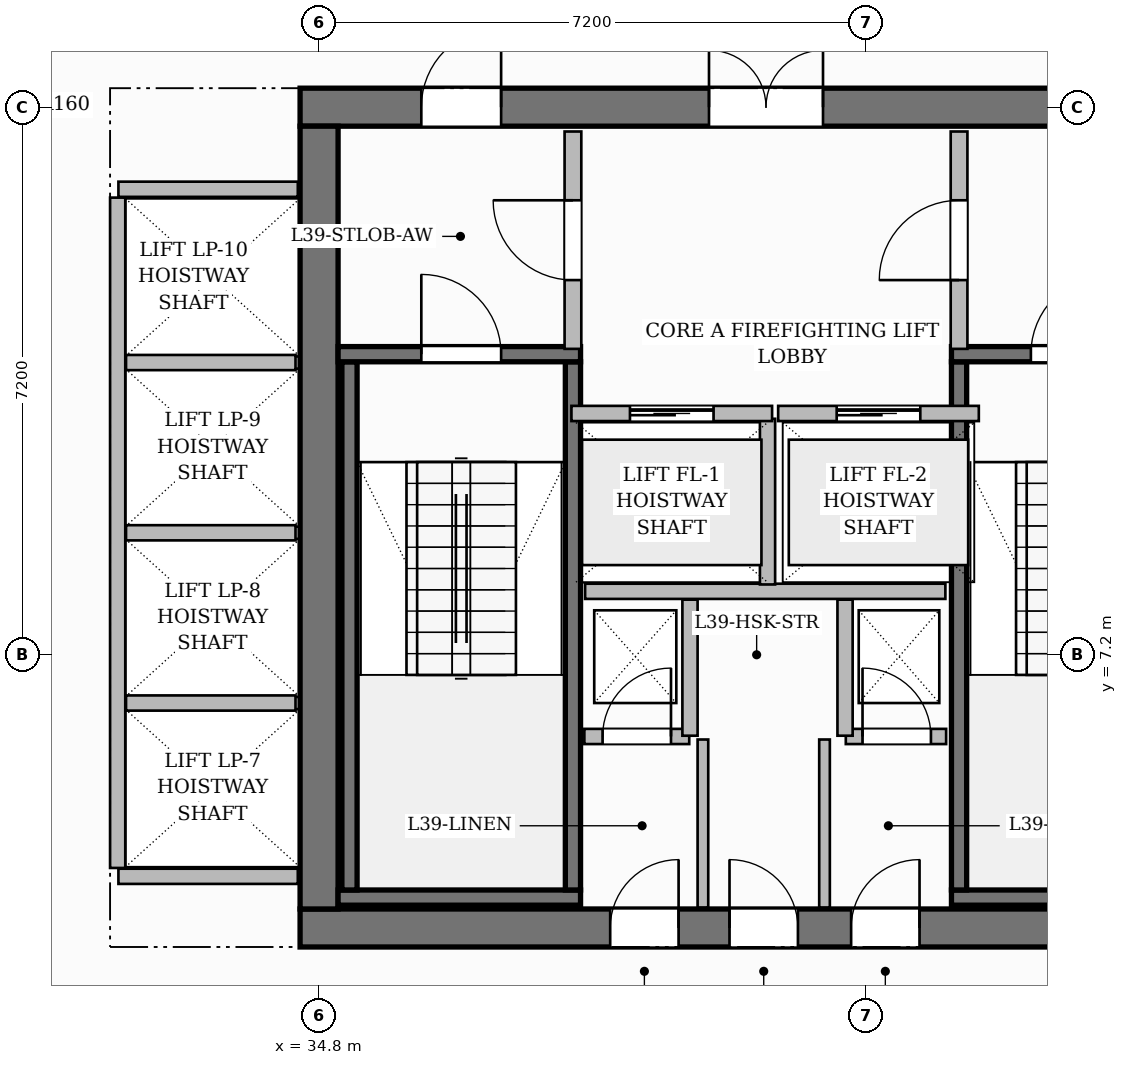
"""IFC4 building model, lengths in metres.
Left out: names, types, materials, properties, quantities, classifications, styles, units other than length and angle.
Written with IfcOpenShell. Run it as: python <this file> out.ifc"""

import sys

from ifc_helpers import new_model, si_unit, direction, frame, frame_2d, origin, place, context, subcontext, project, spatial, rectangle, extrude, source, transform, mapped, element, fill, save


model = new_model("IFC4")
c1 = context("Model", 3, precision=1e-05, world=origin(), true_north=direction((0.0, 1.0)))
c2 = subcontext(c1, "Body", "Model", "MODEL_VIEW")
j1 = project(units=[si_unit("LENGTHUNIT", "METRE"), si_unit("PLANEANGLEUNIT", "RADIAN")], contexts=[c1])
p1 = place(None, origin())
s1 = spatial("IfcSite", under=j1, at=p1, CompositionType="ELEMENT")
p2 = place(p1, origin())
s2 = spatial("IfcBuilding", under=s1, at=p2, CompositionType="ELEMENT")
p3 = place(p2, frame((0.0, 0.0, 158.0)))
s3 = spatial("IfcBuildingStorey", under=s2, at=p3, CompositionType="ELEMENT", Elevation=158.0)
p4 = place(p3, frame((34.55, 3.6, 0.0), z_axis=(0.0, 0.0, 1.0), x_axis=(1.0, 0.0, 0.0)))
e1 = element("IfcWall", 1, at=p4, inside=s3, PredefinedType="SHEAR", context=c2, shape_type="SweptSolid", body=[
    extrude(rectangle(XDim=15.5, YDim=0.5, at=frame_2d((7.75, 0.0))), origin(), (0.0, 0.0, 1.0), 3.85),
])
p5 = place(p4, frame((4.08, 0.0, 0.0)))
e2 = element("IfcOpeningElement", 2, at=p5, cuts=e1, PredefinedType="OPENING", context=c2, shape_type="SweptSolid", body=[
    extrude(rectangle(XDim=0.9, YDim=2.1, at=frame_2d((0.45, 1.05))), frame((0.0, 0.26, 0.0), z_axis=(0.0, -1.0, 0.0), x_axis=(1.0, 0.0, 0.0)), (0.0, 0.0, 1.0), 0.52),
])
p6 = place(p4, frame((5.65, 0.0, 0.0)))
e3 = element("IfcOpeningElement", 3, at=p6, cuts=e1, PredefinedType="OPENING", context=c2, shape_type="SweptSolid", body=[
    extrude(rectangle(XDim=0.9, YDim=2.1, at=frame_2d((0.45, 1.05))), frame((0.0, 0.26, 0.0), z_axis=(0.0, -1.0, 0.0), x_axis=(1.0, 0.0, 0.0)), (0.0, 0.0, 1.0), 0.52),
])
p7 = place(p4, frame((7.25, 0.0, 0.0)))
e4 = element("IfcOpeningElement", 4, at=p7, cuts=e1, PredefinedType="OPENING", context=c2, shape_type="SweptSolid", body=[
    extrude(rectangle(XDim=0.9, YDim=2.1, at=frame_2d((0.45, 1.05))), frame((0.0, 0.26, 0.0), z_axis=(0.0, -1.0, 0.0), x_axis=(1.0, 0.0, 0.0)), (0.0, 0.0, 1.0), 0.52),
])
p8 = place(p3, frame((34.55, 14.4, 0.0), z_axis=(0.0, 0.0, 1.0), x_axis=(1.0, 0.0, 0.0)))
e5 = element("IfcWall", 5, at=p8, inside=s3, PredefinedType="SHEAR", context=c2, shape_type="SweptSolid", body=[
    extrude(rectangle(XDim=15.5, YDim=0.5, at=frame_2d((7.75, 0.0))), origin(), (0.0, 0.0, 1.0), 3.85),
])
p9 = place(p8, frame((5.38, 0.0, 0.0)))
e6 = element("IfcOpeningElement", 6, at=p9, cuts=e5, PredefinedType="OPENING", context=c2, shape_type="SweptSolid", body=[
    extrude(rectangle(XDim=1.5, YDim=2.2, at=frame_2d((0.75, 1.1))), frame((0.0, 0.26, 0.0), z_axis=(0.0, -1.0, 0.0), x_axis=(1.0, 0.0, 0.0)), (0.0, 0.0, 1.0), 0.52),
])
p10 = place(p8, frame((1.595, 0.0, 0.0)))
e7 = element("IfcOpeningElement", 7, at=p10, cuts=e5, PredefinedType="OPENING", context=c2, shape_type="SweptSolid", body=[
    extrude(rectangle(XDim=1.05, YDim=2.15, at=frame_2d((0.525, 1.075))), frame((0.0, 0.26, 0.0), z_axis=(0.0, -1.0, 0.0), x_axis=(1.0, 0.0, 0.0)), (0.0, 0.0, 1.0), 0.52),
])
p11 = place(p8, frame((11.225, 0.0, 0.0)))
e8 = element("IfcOpeningElement", 8, at=p11, cuts=e5, PredefinedType="OPENING", context=c2, shape_type="SweptSolid", body=[
    extrude(rectangle(XDim=1.05, YDim=2.15, at=frame_2d((0.525, 1.075))), frame((0.0, 0.26, 0.0), z_axis=(0.0, -1.0, 0.0), x_axis=(1.0, 0.0, 0.0)), (0.0, 0.0, 1.0), 0.52),
])
p12 = place(p3, frame((34.8, 3.85, 0.0), z_axis=(0.0, 0.0, 1.0), x_axis=(0.0, 1.0, 0.0)))
e9 = element("IfcWall", 9, at=p12, inside=s3, PredefinedType="SHEAR", context=c2, shape_type="SweptSolid", body=[
    extrude(rectangle(XDim=10.3, YDim=0.5, at=frame_2d((5.15, 0.0))), origin(), (0.0, 0.0, 1.0), 3.85),
])
p13 = place(p3, frame((35.05, 4.0, 0.0), z_axis=(0.0, 0.0, 1.0), x_axis=(1.0, 0.0, 0.0)))
e10 = element("IfcWall", 10, at=p13, inside=s3, PredefinedType="SHEAR", context=c2, shape_type="SweptSolid", body=[
    extrude(rectangle(XDim=3.19, YDim=0.2, at=frame_2d((1.595, 0.0))), origin(), (0.0, 0.0, 1.0), 3.85),
])
for number, where, z_axis, x_axis in (
    (11, (35.2, 4.1, 0.0), (0.0, 0.0, 1.0), (0.0, 1.0, 0.0)),
    (12, (38.14, 4.1, 0.0), (0.0, 0.0, 1.0), (0.0, 1.0, 0.0)),
):
    element("IfcWall", number, at=place(p3, frame(where, z_axis=z_axis, x_axis=x_axis)), inside=s3, PredefinedType="SHEAR", context=c2, shape_type="SweptSolid", body=[
        extrude(rectangle(XDim=6.95, YDim=0.2, at=frame_2d((3.475, 0.0))), origin(), (0.0, 0.0, 1.0), 3.85),
    ])
p14 = place(p3, frame((35.05, 11.15, 0.0), z_axis=(0.0, 0.0, 1.0), x_axis=(1.0, 0.0, 0.0)))
e13 = element("IfcWall", 13, at=p14, inside=s3, PredefinedType="SHEAR", context=c2, shape_type="SweptSolid", body=[
    extrude(rectangle(XDim=3.19, YDim=0.2, at=frame_2d((1.595, 0.0))), origin(), (0.0, 0.0, 1.0), 3.85),
])
p15 = place(p14, frame((1.095, 0.0, 0.0)))
e14 = element("IfcOpeningElement", 14, at=p15, cuts=e13, PredefinedType="OPENING", context=c2, shape_type="SweptSolid", body=[
    extrude(rectangle(XDim=1.05, YDim=2.2, at=frame_2d((0.525, 1.1))), frame((0.0, 0.11, 0.0), z_axis=(0.0, -1.0, 0.0), x_axis=(1.0, 0.0, 0.0)), (0.0, 0.0, 1.0), 0.22),
])
p16 = place(p3, frame((43.12, 4.0, 0.0), z_axis=(0.0, 0.0, 1.0), x_axis=(1.0, 0.0, 0.0)))
e15 = element("IfcWall", 15, at=p16, inside=s3, PredefinedType="SHEAR", context=c2, shape_type="SweptSolid", body=[
    extrude(rectangle(XDim=6.43, YDim=0.2, at=frame_2d((3.215, 0.0))), origin(), (0.0, 0.0, 1.0), 3.85),
])
p17 = place(p3, frame((43.22, 4.1, 0.0), z_axis=(0.0, 0.0, 1.0), x_axis=(0.0, 1.0, 0.0)))
e16 = element("IfcWall", 16, at=p17, inside=s3, PredefinedType="SHEAR", context=c2, shape_type="SweptSolid", body=[
    extrude(rectangle(XDim=6.95, YDim=0.2, at=frame_2d((3.475, 0.0))), origin(), (0.0, 0.0, 1.0), 3.85),
])
p18 = place(p3, frame((43.12, 11.15, 0.0), z_axis=(0.0, 0.0, 1.0), x_axis=(1.0, 0.0, 0.0)))
e17 = element("IfcWall", 17, at=p18, inside=s3, PredefinedType="SHEAR", context=c2, shape_type="SweptSolid", body=[
    extrude(rectangle(XDim=6.43, YDim=0.2, at=frame_2d((3.215, 0.0))), origin(), (0.0, 0.0, 1.0), 3.85),
])
p19 = place(p18, frame((1.045, 0.0, 0.0)))
e18 = element("IfcOpeningElement", 18, at=p19, cuts=e17, PredefinedType="OPENING", context=c2, shape_type="SweptSolid", body=[
    extrude(rectangle(XDim=1.05, YDim=2.2, at=frame_2d((0.525, 1.1))), frame((0.0, 0.11, 0.0), z_axis=(0.0, -1.0, 0.0), x_axis=(1.0, 0.0, 0.0)), (0.0, 0.0, 1.0), 0.22),
])
p20 = place(p18, frame((4.125, 0.0, 0.0)))
e19 = element("IfcOpeningElement", 19, at=p20, cuts=e17, PredefinedType="OPENING", context=c2, shape_type="SweptSolid", body=[
    extrude(rectangle(XDim=1.05, YDim=2.2, at=frame_2d((0.525, 1.1))), frame((0.0, 0.11, 0.0), z_axis=(0.0, -1.0, 0.0), x_axis=(1.0, 0.0, 0.0)), (0.0, 0.0, 1.0), 0.22),
])
p21 = place(p3, frame((38.3, 8.03, 0.0), z_axis=(0.0, 0.0, 1.0), x_axis=(1.0, 0.0, 0.0)))
e20 = element("IfcWall", 20, at=p21, inside=s3, PredefinedType="PARTITIONING", context=c2, shape_type="SweptSolid", body=[
    extrude(rectangle(XDim=4.74, YDim=0.2, at=frame_2d((2.37, 0.0))), origin(), (0.0, 0.0, 1.0), 3.6),
])
p22 = place(p3, frame((40.7, 8.12, 0.0), z_axis=(0.0, 0.0, 1.0), x_axis=(0.0, 1.0, 0.0)))
e21 = element("IfcWall", 21, at=p22, inside=s3, PredefinedType="PARTITIONING", context=c2, shape_type="SweptSolid", body=[
    extrude(rectangle(XDim=2.18, YDim=0.2, at=frame_2d((1.09, 0.0))), origin(), (0.0, 0.0, 1.0), 3.6),
])
p23 = place(p3, frame((38.14, 11.22, 0.0), z_axis=(0.0, 0.0, 1.0), x_axis=(0.0, 1.0, 0.0)))
e22 = element("IfcWall", 22, at=p23, inside=s3, PredefinedType="PARTITIONING", context=c2, shape_type="SweptSolid", body=[
    extrude(rectangle(XDim=2.86, YDim=0.22, at=frame_2d((1.43, 0.0))), origin(), (0.0, 0.0, 1.0), 3.6),
])
p24 = place(p23, frame((0.905, 0.0, 0.0)))
e23 = element("IfcOpeningElement", 23, at=p24, cuts=e22, PredefinedType="OPENING", context=c2, shape_type="SweptSolid", body=[
    extrude(rectangle(XDim=1.05, YDim=2.15, at=frame_2d((0.525, 1.075))), frame((0.0, 0.12, 0.0), z_axis=(0.0, -1.0, 0.0), x_axis=(1.0, 0.0, 0.0)), (0.0, 0.0, 1.0), 0.24),
])
p25 = place(p3, frame((43.22, 11.22, 0.0), z_axis=(0.0, 0.0, 1.0), x_axis=(0.0, 1.0, 0.0)))
e24 = element("IfcWall", 24, at=p25, inside=s3, PredefinedType="PARTITIONING", context=c2, shape_type="SweptSolid", body=[
    extrude(rectangle(XDim=2.86, YDim=0.22, at=frame_2d((1.43, 0.0))), origin(), (0.0, 0.0, 1.0), 3.6),
])
p26 = place(p25, frame((0.905, 0.0, 0.0)))
e25 = element("IfcOpeningElement", 25, at=p26, cuts=e24, PredefinedType="OPENING", context=c2, shape_type="SweptSolid", body=[
    extrude(rectangle(XDim=1.05, YDim=2.15, at=frame_2d((0.525, 1.075))), frame((0.0, 0.12, 0.0), z_axis=(0.0, -1.0, 0.0), x_axis=(1.0, 0.0, 0.0)), (0.0, 0.0, 1.0), 0.24),
])
p27 = place(p3, frame((38.29, 6.12, 0.0), z_axis=(0.0, 0.0, 1.0), x_axis=(1.0, 0.0, 0.0)))
e26 = element("IfcWall", 26, at=p27, inside=s3, PredefinedType="PARTITIONING", context=c2, shape_type="SweptSolid", body=[
    extrude(rectangle(XDim=1.38, YDim=0.2, at=frame_2d((0.69, 0.0))), origin(), (0.0, 0.0, 1.0), 3.6),
])
p28 = place(p27, frame((0.24, 0.0, 0.0)))
e27 = element("IfcOpeningElement", 27, at=p28, cuts=e26, PredefinedType="OPENING", context=c2, shape_type="SweptSolid", body=[
    extrude(rectangle(XDim=0.9, YDim=2.1, at=frame_2d((0.45, 1.05))), frame((0.0, 0.11, 0.0), z_axis=(0.0, -1.0, 0.0), x_axis=(1.0, 0.0, 0.0)), (0.0, 0.0, 1.0), 0.22),
])
p29 = place(p3, frame((39.68, 6.13, 0.0), z_axis=(0.0, 0.0, 1.0), x_axis=(0.0, 1.0, 0.0)))
e28 = element("IfcWall", 28, at=p29, inside=s3, PredefinedType="PARTITIONING", context=c2, shape_type="SweptSolid", body=[
    extrude(rectangle(XDim=1.79, YDim=0.2, at=frame_2d((0.895, 0.0))), origin(), (0.0, 0.0, 1.0), 3.6),
])
p30 = place(p3, frame((41.73, 6.12, 0.0), z_axis=(0.0, 0.0, 1.0), x_axis=(1.0, 0.0, 0.0)))
e29 = element("IfcWall", 29, at=p30, inside=s3, PredefinedType="PARTITIONING", context=c2, shape_type="SweptSolid", body=[
    extrude(rectangle(XDim=1.32, YDim=0.2, at=frame_2d((0.66, 0.0))), origin(), (0.0, 0.0, 1.0), 3.6),
])
p31 = place(p30, frame((0.22, 0.0, 0.0)))
e30 = element("IfcOpeningElement", 30, at=p31, cuts=e29, PredefinedType="OPENING", context=c2, shape_type="SweptSolid", body=[
    extrude(rectangle(XDim=0.9, YDim=2.1, at=frame_2d((0.45, 1.05))), frame((0.0, 0.11, 0.0), z_axis=(0.0, -1.0, 0.0), x_axis=(1.0, 0.0, 0.0)), (0.0, 0.0, 1.0), 0.22),
])
p32 = place(p3, frame((41.72, 6.13, 0.0), z_axis=(0.0, 0.0, 1.0), x_axis=(0.0, 1.0, 0.0)))
e31 = element("IfcWall", 31, at=p32, inside=s3, PredefinedType="PARTITIONING", context=c2, shape_type="SweptSolid", body=[
    extrude(rectangle(XDim=1.79, YDim=0.2, at=frame_2d((0.895, 0.0))), origin(), (0.0, 0.0, 1.0), 3.6),
])
for number, where, z_axis, x_axis in (
    (32, (39.85, 3.87, 0.0), (0.0, 0.0, 1.0), (0.0, 1.0, 0.0)),
    (33, (41.45, 3.87, 0.0), (0.0, 0.0, 1.0), (0.0, 1.0, 0.0)),
):
    element("IfcWall", number, at=place(p3, frame(where, z_axis=z_axis, x_axis=x_axis)), inside=s3, PredefinedType="PARTITIONING", context=c2, shape_type="SweptSolid", body=[
        extrude(rectangle(XDim=2.21, YDim=0.14, at=frame_2d((1.105, 0.0))), origin(), (0.0, 0.0, 1.0), 3.6),
    ])
for number, where, z_axis, x_axis in (
    (34, (32.16, 4.28, 0.0), (0.0, 0.0, 1.0), (1.0, 0.0, 0.0)),
    (35, (32.16, 13.32, 0.0), (0.0, 0.0, 1.0), (1.0, 0.0, 0.0)),
):
    element("IfcWall", number, at=place(p3, frame(where, z_axis=z_axis, x_axis=x_axis)), inside=s3, PredefinedType="PARTITIONING", context=c2, shape_type="SweptSolid", body=[
        extrude(rectangle(XDim=2.36, YDim=0.2, at=frame_2d((1.18, 0.0))), origin(), (0.0, 0.0, 1.0), 3.6),
    ])
p33 = place(p3, frame((32.15, 4.39, 0.0), z_axis=(0.0, 0.0, 1.0), x_axis=(0.0, 1.0, 0.0)))
e36 = element("IfcWall", 36, at=p33, inside=s3, PredefinedType="PARTITIONING", context=c2, shape_type="SweptSolid", body=[
    extrude(rectangle(XDim=8.82, YDim=0.2, at=frame_2d((4.41, 0.0))), origin(), (0.0, 0.0, 1.0), 3.6),
])
for number, where, z_axis, x_axis in (
    (37, (32.26, 6.56, 0.0), (0.0, 0.0, 1.0), (1.0, 0.0, 0.0)),
    (38, (32.26, 8.8, 0.0), (0.0, 0.0, 1.0), (1.0, 0.0, 0.0)),
    (39, (32.26, 11.04, 0.0), (0.0, 0.0, 1.0), (1.0, 0.0, 0.0)),
):
    element("IfcWall", number, at=place(p3, frame(where, z_axis=z_axis, x_axis=x_axis)), inside=s3, PredefinedType="PARTITIONING", context=c2, shape_type="SweptSolid", body=[
        extrude(rectangle(XDim=2.23, YDim=0.2, at=frame_2d((1.115, 0.0))), origin(), (0.0, 0.0, 1.0), 3.6),
    ])
p34 = place(p3, frame((38.12, 10.37, 0.0), z_axis=(0.0, 0.0, 1.0), x_axis=(1.0, 0.0, 0.0)))
e40 = element("IfcWall", 40, at=p34, inside=s3, PredefinedType="PARTITIONING", context=c2, shape_type="SweptSolid", body=[
    extrude(rectangle(XDim=2.64, YDim=0.2, at=frame_2d((1.32, 0.0))), origin(), (0.0, 0.0, 1.0), 3.6),
])
p35 = place(p34, frame((0.77, 0.0, 0.0)))
e41 = element("IfcOpeningElement", 41, at=p35, cuts=e40, PredefinedType="OPENING", context=c2, shape_type="SweptSolid", body=[
    extrude(rectangle(XDim=1.1, YDim=2.2, at=frame_2d((0.55, 1.1))), frame((0.0, 0.11, 0.0), z_axis=(0.0, -1.0, 0.0), x_axis=(1.0, 0.0, 0.0)), (0.0, 0.0, 1.0), 0.22),
])
p36 = place(p3, frame((40.84, 10.37, 0.0), z_axis=(0.0, 0.0, 1.0), x_axis=(1.0, 0.0, 0.0)))
e42 = element("IfcWall", 42, at=p36, inside=s3, PredefinedType="PARTITIONING", context=c2, shape_type="SweptSolid", body=[
    extrude(rectangle(XDim=2.64, YDim=0.2, at=frame_2d((1.32, 0.0))), origin(), (0.0, 0.0, 1.0), 3.6),
])
p37 = place(p36, frame((0.77, 0.0, 0.0)))
e43 = element("IfcOpeningElement", 43, at=p37, cuts=e42, PredefinedType="OPENING", context=c2, shape_type="SweptSolid", body=[
    extrude(rectangle(XDim=1.1, YDim=2.2, at=frame_2d((0.55, 1.1))), frame((0.0, 0.11, 0.0), z_axis=(0.0, -1.0, 0.0), x_axis=(1.0, 0.0, 0.0)), (0.0, 0.0, 1.0), 0.22),
])
m1 = source(origin(), c2, "Body", "SweptSolid", [
    extrude(rectangle(XDim=1.05, YDim=2.2, at=frame_2d((0.525, 1.1))), frame((0.0, 0.025, 0.0), z_axis=(0.0, -1.0, 0.0), x_axis=(1.0, 0.0, 0.0)), (0.0, 0.0, 1.0), 0.05),
])
p38 = place(p15, origin())
e44 = element("IfcDoor", 44, at=p38, inside=s3, OperationType="SINGLE_SWING_LEFT", PredefinedType="DOOR", context=c2, shape_type="MappedRepresentation", body=[
    mapped(m1, transform((0.0, 0.0, 0.0), scale=1.0)),
])
fill(e14, e44)
p39 = place(p19, origin())
e45 = element("IfcDoor", 45, at=p39, inside=s3, OperationType="SINGLE_SWING_RIGHT", PredefinedType="DOOR", context=c2, shape_type="MappedRepresentation", body=[
    mapped(m1, transform((0.0, 0.0, 0.0), scale=1.0)),
])
fill(e18, e45)
m2 = source(origin(), c2, "Body", "SweptSolid", [
    extrude(rectangle(XDim=1.05, YDim=2.15, at=frame_2d((0.525, 1.075))), frame((0.0, 0.025, 0.0), z_axis=(0.0, -1.0, 0.0), x_axis=(1.0, 0.0, 0.0)), (0.0, 0.0, 1.0), 0.05),
])
p40 = place(p24, origin())
e46 = element("IfcDoor", 46, at=p40, inside=s3, OperationType="SINGLE_SWING_RIGHT", PredefinedType="DOOR", context=c2, shape_type="MappedRepresentation", body=[
    mapped(m2, transform((0.0, 0.0, 0.0), scale=1.0)),
])
fill(e23, e46)
p41 = place(p26, origin())
e47 = element("IfcDoor", 47, at=p41, inside=s3, OperationType="SINGLE_SWING_LEFT", PredefinedType="DOOR", context=c2, shape_type="MappedRepresentation", body=[
    mapped(m2, transform((0.0, 0.0, 0.0), scale=1.0)),
])
fill(e25, e47)
m3 = source(origin(), c2, "Body", "SweptSolid", [
    extrude(rectangle(XDim=1.5, YDim=2.2, at=frame_2d((0.75, 1.1))), frame((0.0, 0.025, 0.0), z_axis=(0.0, -1.0, 0.0), x_axis=(1.0, 0.0, 0.0)), (0.0, 0.0, 1.0), 0.05),
])
p42 = place(p9, origin())
e48 = element("IfcDoor", 48, at=p42, inside=s3, OperationType="DOUBLE_DOOR_SINGLE_SWING", PredefinedType="DOOR", context=c2, shape_type="MappedRepresentation", body=[
    mapped(m3, transform((0.0, 0.0, 0.0), scale=1.0)),
])
fill(e6, e48)
p43 = place(p10, origin())
e49 = element("IfcDoor", 49, at=p43, inside=s3, OperationType="SINGLE_SWING_RIGHT", PredefinedType="DOOR", context=c2, shape_type="MappedRepresentation", body=[
    mapped(m2, transform((0.0, 0.0, 0.0), scale=1.0)),
])
fill(e7, e49)
m4 = source(origin(), c2, "Body", "SweptSolid", [
    extrude(rectangle(XDim=0.9, YDim=2.1, at=frame_2d((0.45, 1.05))), frame((0.0, 0.025, 0.0), z_axis=(0.0, -1.0, 0.0), x_axis=(1.0, 0.0, 0.0)), (0.0, 0.0, 1.0), 0.05),
])
p44 = place(p28, origin())
e50 = element("IfcDoor", 50, at=p44, inside=s3, OperationType="SINGLE_SWING_RIGHT", PredefinedType="DOOR", context=c2, shape_type="MappedRepresentation", body=[
    mapped(m4, transform((0.0, 0.0, 0.0), scale=1.0)),
])
fill(e27, e50)
p45 = place(p31, origin())
e51 = element("IfcDoor", 51, at=p45, inside=s3, OperationType="SINGLE_SWING_LEFT", PredefinedType="DOOR", context=c2, shape_type="MappedRepresentation", body=[
    mapped(m4, transform((0.0, 0.0, 0.0), scale=1.0)),
])
fill(e30, e51)
p46 = place(p5, origin())
e52 = element("IfcDoor", 52, at=p46, inside=s3, OperationType="SINGLE_SWING_RIGHT", PredefinedType="DOOR", context=c2, shape_type="MappedRepresentation", body=[
    mapped(m4, transform((0.0, 0.0, 0.0), scale=1.0)),
])
fill(e2, e52)
p47 = place(p6, origin())
e53 = element("IfcDoor", 53, at=p47, inside=s3, OperationType="SINGLE_SWING_LEFT", PredefinedType="DOOR", context=c2, shape_type="MappedRepresentation", body=[
    mapped(m4, transform((0.0, 0.0, 0.0), scale=1.0)),
])
fill(e3, e53)
p48 = place(p7, origin())
e54 = element("IfcDoor", 54, at=p48, inside=s3, OperationType="SINGLE_SWING_RIGHT", PredefinedType="DOOR", context=c2, shape_type="MappedRepresentation", body=[
    mapped(m4, transform((0.0, 0.0, 0.0), scale=1.0)),
])
fill(e4, e54)
m5 = source(origin(), c2, "Body", "SweptSolid", [
    extrude(rectangle(XDim=1.1, YDim=2.2, at=frame_2d((0.55, 1.1))), frame((0.0, 0.025, 0.0), z_axis=(0.0, -1.0, 0.0), x_axis=(1.0, 0.0, 0.0)), (0.0, 0.0, 1.0), 0.05),
])
p49 = place(p35, origin())
e55 = element("IfcDoor", 55, at=p49, inside=s3, OperationType="SLIDING_TO_LEFT", PredefinedType="DOOR", context=c2, shape_type="MappedRepresentation", body=[
    mapped(m5, transform((0.0, 0.0, 0.0), scale=1.0)),
])
fill(e41, e55)
p50 = place(p37, origin())
e56 = element("IfcDoor", 56, at=p50, inside=s3, OperationType="SLIDING_TO_LEFT", PredefinedType="DOOR", context=c2, shape_type="MappedRepresentation", body=[
    mapped(m5, transform((0.0, 0.0, 0.0), scale=1.0)),
])
fill(e43, e56)
save(model, sys.argv[1])
